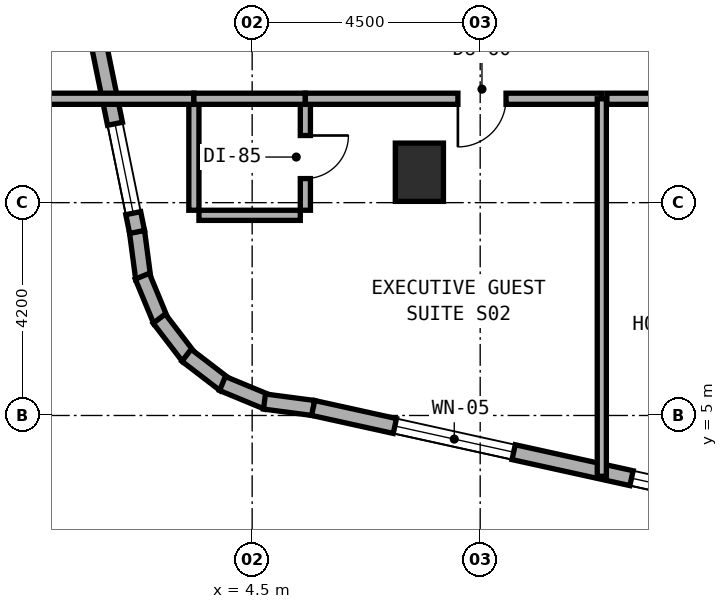
"""IFC4 building model, lengths in metres.
Left out: names, types, materials, properties, quantities, classifications, styles, units other than length and angle.
Written with IfcOpenShell. Run it as: python <this file> out.ifc"""

import sys

from ifc_helpers import new_model, si_unit, direction, frame, frame_2d, origin, origin_2d, place, context, subcontext, project, spatial, rectangle, extrude, element, fill, save


model = new_model("IFC4")
c1 = context("Model", 3, precision=1e-05, world=origin(), true_north=direction((0.0, 1.0)))
c2 = subcontext(c1, "Body", "Model", "MODEL_VIEW")
j1 = project(units=[si_unit("LENGTHUNIT", "METRE"), si_unit("PLANEANGLEUNIT", "RADIAN")], contexts=[c1])
p1 = place(None, origin())
s1 = spatial("IfcSite", under=j1, at=p1, CompositionType="ELEMENT")
p2 = place(p1, origin())
s2 = spatial("IfcBuilding", under=s1, at=p2, CompositionType="ELEMENT")
p3 = place(p2, frame((0.0, 0.0, 73.0)))
s3 = spatial("IfcBuildingStorey", under=s2, at=p3, CompositionType="ELEMENT", Elevation=73.0)
p4 = place(p3, frame((7.8, 9.8, 0.0), z_axis=(0.0, 0.0, 1.0), x_axis=(1.0, 0.0, 0.0)))
e1 = element("IfcColumn", 1, at=p4, inside=s3, PredefinedType="COLUMN", context=c2, shape_type="SweptSolid", body=[
    extrude(rectangle(XDim=0.95, YDim=1.15, at=origin_2d()), origin(), (0.0, 0.0, 1.0), 3.5),
])
p5 = place(p3, frame((2.228, 8.628, 0.0), z_axis=(0.0, 0.0, 1.0), x_axis=(0.131174864804, -0.991359246108, 0.0)))
e2 = element("IfcWall", 2, at=p5, inside=s3, PredefinedType="STANDARD", context=c2, shape_type="SweptSolid", body=[
    extrude(rectangle(XDim=0.938, YDim=0.3, at=frame_2d((0.469, 0.0))), origin(), (0.0, 0.0, 1.0), 3.22),
])
p6 = place(p3, frame((2.332, 7.748, 0.0), z_axis=(0.0, 0.0, 1.0), x_axis=(0.382344263057, -0.924019948111, 0.0)))
e3 = element("IfcWall", 3, at=p6, inside=s3, PredefinedType="STANDARD", context=c2, shape_type="SweptSolid", body=[
    extrude(rectangle(XDim=0.955, YDim=0.3, at=frame_2d((0.477, 0.0))), origin(), (0.0, 0.0, 1.0), 3.22),
])
for number, where, z_axis, x_axis in (
    (4, (2.666, 6.911, 0.0), (0.0, 0.0, 1.0), (0.608, -0.794, 0.0)),
    (5, (3.205, 6.188, 0.0), (0.0, 0.0, 1.0), (0.794, -0.608, 0.0)),
):
    element("IfcWall", number, at=place(p3, frame(where, z_axis=z_axis, x_axis=x_axis)), inside=s3, PredefinedType="STANDARD", context=c2, shape_type="SweptSolid", body=[
        extrude(rectangle(XDim=0.955, YDim=0.3, at=frame_2d((0.478, 0.0))), origin(), (0.0, 0.0, 1.0), 3.22),
    ])
p7 = place(p3, frame((3.914, 5.631, 0.0), z_axis=(0.0, 0.0, 1.0), x_axis=(0.923982547689, -0.382434636986, 0.0)))
e6 = element("IfcWall", 6, at=p7, inside=s3, PredefinedType="STANDARD", context=c2, shape_type="SweptSolid", body=[
    extrude(rectangle(XDim=0.954, YDim=0.3, at=frame_2d((0.477, 0.0))), origin(), (0.0, 0.0, 1.0), 3.22),
])
p8 = place(p3, frame((4.743, 5.275, 0.0), z_axis=(0.0, 0.0, 1.0), x_axis=(0.99145856342, -0.130422072598, 0.0)))
e7 = element("IfcWall", 7, at=p8, inside=s3, PredefinedType="STANDARD", context=c2, shape_type="SweptSolid", body=[
    extrude(rectangle(XDim=0.973, YDim=0.3, at=frame_2d((0.487, 0.0))), origin(), (0.0, 0.0, 1.0), 3.22),
])
p9 = place(p3, frame((5.704, 5.148, 0.0), z_axis=(0.0, 0.0, 1.0), x_axis=(0.9765437942, -0.215318875183, 0.0)))
e8 = element("IfcWall", 8, at=p9, inside=s3, PredefinedType="STANDARD", context=c2, shape_type="SweptSolid", body=[
    extrude(rectangle(XDim=9.353, YDim=0.3, at=frame_2d((4.677, 0.0))), origin(), (0.0, 0.0, 1.0), 3.22),
])
p10 = place(p9, frame((1.651, 0.0, 0.8)))
e9 = element("IfcOpeningElement", 9, at=p10, cuts=e8, PredefinedType="OPENING", context=c2, shape_type="SweptSolid", body=[
    extrude(rectangle(XDim=2.4, YDim=1.6, at=frame_2d((1.2, 0.8))), frame((0.0, 0.16, 0.0), z_axis=(0.0, -1.0, 0.0), x_axis=(1.0, 0.0, 0.0)), (0.0, 0.0, 1.0), 0.32),
])
p11 = place(p9, frame((6.433, 0.0, 0.8)))
e10 = element("IfcOpeningElement", 10, at=p11, cuts=e8, PredefinedType="OPENING", context=c2, shape_type="SweptSolid", body=[
    extrude(rectangle(XDim=2.4, YDim=1.6, at=frame_2d((1.2, 0.8))), frame((0.0, 0.16, 0.0), z_axis=(0.0, -1.0, 0.0), x_axis=(1.0, 0.0, 0.0)), (0.0, 0.0, 1.0), 0.32),
])
p12 = place(p3, frame((0.216, 18.484, 0.0), z_axis=(0.0, 0.0, 1.0), x_axis=(0.199990901713, -0.979797754249, 0.0)))
e11 = element("IfcWall", 11, at=p12, inside=s3, PredefinedType="STANDARD", context=c2, shape_type="SweptSolid", body=[
    extrude(rectangle(XDim=10.065, YDim=0.3, at=frame_2d((5.033, 0.0))), origin(), (0.0, 0.0, 1.0), 3.22),
])
p13 = place(p12, frame((2.429, 0.0, 0.8)))
e12 = element("IfcOpeningElement", 12, at=p13, cuts=e11, PredefinedType="OPENING", context=c2, shape_type="SweptSolid", body=[
    extrude(rectangle(XDim=2.4, YDim=1.6, at=frame_2d((1.2, 0.8))), frame((0.0, 0.16, 0.0), z_axis=(0.0, -1.0, 0.0), x_axis=(1.0, 0.0, 0.0)), (0.0, 0.0, 1.0), 0.32),
])
p14 = place(p12, frame((7.887, 0.0, 0.85)))
e13 = element("IfcOpeningElement", 13, at=p14, cuts=e11, PredefinedType="OPENING", context=c2, shape_type="SweptSolid", body=[
    extrude(rectangle(XDim=1.8, YDim=1.5, at=frame_2d((0.9, 0.75))), frame((0.0, 0.16, 0.0), z_axis=(0.0, -1.0, 0.0), x_axis=(1.0, 0.0, 0.0)), (0.0, 0.0, 1.0), 0.32),
])
p15 = place(p3, frame((5.55, 9.05, 0.0), z_axis=(0.0, 0.0, 1.0), x_axis=(0.0, 1.0, 0.0)))
e14 = element("IfcWall", 14, at=p15, inside=s3, PredefinedType="PLUMBINGWALL", context=c2, shape_type="SweptSolid", body=[
    extrude(rectangle(XDim=2.1, YDim=0.2, at=frame_2d((1.05, 0.0))), origin(), (0.0, 0.0, 1.0), 3.22),
])
p16 = place(p15, frame((0.625, 0.0, 0.0)))
e15 = element("IfcOpeningElement", 15, at=p16, cuts=e14, PredefinedType="OPENING", context=c2, shape_type="SweptSolid", body=[
    extrude(rectangle(XDim=0.85, YDim=2.1, at=frame_2d((0.425, 1.05))), frame((0.0, 0.11, 0.0), z_axis=(0.0, -1.0, 0.0), x_axis=(1.0, 0.0, 0.0)), (0.0, 0.0, 1.0), 0.22),
])
p17 = place(p3, frame((3.45, 8.95, 0.0), z_axis=(0.0, 0.0, 1.0), x_axis=(1.0, 0.0, 0.0)))
e16 = element("IfcWall", 16, at=p17, inside=s3, PredefinedType="PLUMBINGWALL", context=c2, shape_type="SweptSolid", body=[
    extrude(rectangle(XDim=2.0, YDim=0.2, at=frame_2d((1.0, 0.0))), origin(), (0.0, 0.0, 1.0), 3.22),
])
p18 = place(p3, frame((3.35, 9.05, 0.0), z_axis=(0.0, 0.0, 1.0), x_axis=(0.0, 1.0, 0.0)))
e17 = element("IfcWall", 17, at=p18, inside=s3, PredefinedType="PLUMBINGWALL", context=c2, shape_type="SweptSolid", body=[
    extrude(rectangle(XDim=2.1, YDim=0.2, at=frame_2d((1.05, 0.0))), origin(), (0.0, 0.0, 1.0), 3.22),
])
p19 = place(p3, frame((0.24, 11.25, 0.0), z_axis=(0.0, 0.0, 1.0), x_axis=(1.0, 0.0, 0.0)))
e18 = element("IfcWall", 18, at=p19, inside=s3, PredefinedType="SOLIDWALL", context=c2, shape_type="SweptSolid", body=[
    extrude(rectangle(XDim=3.11, YDim=0.22, at=frame_2d((1.555, 0.0))), origin(), (0.0, 0.0, 1.0), 3.22),
])
p20 = place(p3, frame((3.35, 11.25, 0.0), z_axis=(0.0, 0.0, 1.0), x_axis=(1.0, 0.0, 0.0)))
e19 = element("IfcWall", 19, at=p20, inside=s3, PredefinedType="SOLIDWALL", context=c2, shape_type="SweptSolid", body=[
    extrude(rectangle(XDim=2.2, YDim=0.22, at=frame_2d((1.1, 0.0))), origin(), (0.0, 0.0, 1.0), 3.22),
])
p21 = place(p3, frame((5.55, 11.25, 0.0), z_axis=(0.0, 0.0, 1.0), x_axis=(1.0, 0.0, 0.0)))
e20 = element("IfcWall", 20, at=p21, inside=s3, PredefinedType="SOLIDWALL", context=c2, shape_type="SweptSolid", body=[
    extrude(rectangle(XDim=5.85, YDim=0.22, at=frame_2d((2.925, 0.0))), origin(), (0.0, 0.0, 1.0), 2.495),
])
p22 = place(p21, frame((3.01, 0.0, 0.0)))
e21 = element("IfcOpeningElement", 21, at=p22, cuts=e20, PredefinedType="OPENING", context=c2, shape_type="SweptSolid", body=[
    extrude(rectangle(XDim=0.95, YDim=2.1, at=frame_2d((0.475, 1.05))), frame((0.0, 0.12, 0.0), z_axis=(0.0, -1.0, 0.0), x_axis=(1.0, 0.0, 0.0)), (0.0, 0.0, 1.0), 0.24),
])
p23 = place(p3, frame((11.4, 3.8, 0.0), z_axis=(0.0, 0.0, 1.0), x_axis=(0.0, 1.0, 0.0)))
e22 = element("IfcWall", 22, at=p23, inside=s3, PredefinedType="SOLIDWALL", context=c2, shape_type="SweptSolid", body=[
    extrude(rectangle(XDim=7.45, YDim=0.18, at=frame_2d((3.725, 0.0))), origin(), (0.0, 0.0, 1.0), 2.745),
])
p24 = place(p3, frame((11.5, 11.25, 0.0), z_axis=(0.0, 0.0, 1.0), x_axis=(1.0, 0.0, 0.0)))
e23 = element("IfcWall", 23, at=p24, inside=s3, PredefinedType="SOLIDWALL", context=c2, shape_type="SweptSolid", body=[
    extrude(rectangle(XDim=11.0, YDim=0.22, at=frame_2d((5.5, 0.0))), origin(), (0.0, 0.0, 1.0), 2.495),
])
p25 = place(p24, frame((5.363, 0.0, 0.0)))
e24 = element("IfcOpeningElement", 24, at=p25, cuts=e23, PredefinedType="OPENING", context=c2, shape_type="SweptSolid", body=[
    extrude(rectangle(XDim=0.95, YDim=2.1, at=frame_2d((0.475, 1.05))), frame((0.0, 0.12, 0.0), z_axis=(0.0, -1.0, 0.0), x_axis=(1.0, 0.0, 0.0)), (0.0, 0.0, 1.0), 0.24),
])
p26 = place(p10, origin())
e25 = element("IfcWindow", 25, at=p26, inside=s3, PartitioningType="SINGLE_PANEL", PredefinedType="WINDOW", context=c2, shape_type="SweptSolid", body=[
    extrude(rectangle(XDim=2.4, YDim=1.6, at=frame_2d((1.2, 0.8))), frame((0.0, 0.03, 0.0), z_axis=(0.0, -1.0, 0.0), x_axis=(1.0, 0.0, 0.0)), (0.0, 0.0, 1.0), 0.06),
])
fill(e9, e25)
p27 = place(p11, origin())
e26 = element("IfcWindow", 26, at=p27, inside=s3, PartitioningType="SINGLE_PANEL", PredefinedType="WINDOW", context=c2, shape_type="SweptSolid", body=[
    extrude(rectangle(XDim=2.4, YDim=1.6, at=frame_2d((1.2, 0.8))), frame((0.0, 0.03, 0.0), z_axis=(0.0, -1.0, 0.0), x_axis=(1.0, 0.0, 0.0)), (0.0, 0.0, 1.0), 0.06),
])
fill(e10, e26)
p28 = place(p14, origin())
e27 = element("IfcWindow", 27, at=p28, inside=s3, PartitioningType="SINGLE_PANEL", PredefinedType="WINDOW", context=c2, shape_type="SweptSolid", body=[
    extrude(rectangle(XDim=1.8, YDim=1.5, at=frame_2d((0.9, 0.75))), frame((0.0, 0.03, 0.0), z_axis=(0.0, -1.0, 0.0), x_axis=(1.0, 0.0, 0.0)), (0.0, 0.0, 1.0), 0.06),
])
fill(e13, e27)
p29 = place(p16, frame((0.85, 0.0, 0.0), z_axis=(0.0, 0.0, 1.0), x_axis=(-1.0, 0.0, 0.0)))
e28 = element("IfcDoor", 28, at=p29, inside=s3, OperationType="SINGLE_SWING_LEFT", PredefinedType="DOOR", context=c2, shape_type="SweptSolid", body=[
    extrude(rectangle(XDim=0.85, YDim=2.1, at=frame_2d((0.425, 1.05))), frame((0.0, 0.025, 0.0), z_axis=(0.0, -1.0, 0.0), x_axis=(1.0, 0.0, 0.0)), (0.0, 0.0, 1.0), 0.05),
])
fill(e15, e28)
p30 = place(p22, frame((0.95, 0.0, 0.0), z_axis=(0.0, 0.0, 1.0), x_axis=(-1.0, 0.0, 0.0)))
e29 = element("IfcDoor", 29, at=p30, inside=s3, OperationType="SINGLE_SWING_RIGHT", PredefinedType="DOOR", context=c2, shape_type="SweptSolid", body=[
    extrude(rectangle(XDim=0.95, YDim=2.1, at=frame_2d((0.475, 1.05))), frame((0.0, 0.025, 0.0), z_axis=(0.0, -1.0, 0.0), x_axis=(1.0, 0.0, 0.0)), (0.0, 0.0, 1.0), 0.05),
])
fill(e21, e29)
save(model, sys.argv[1])
